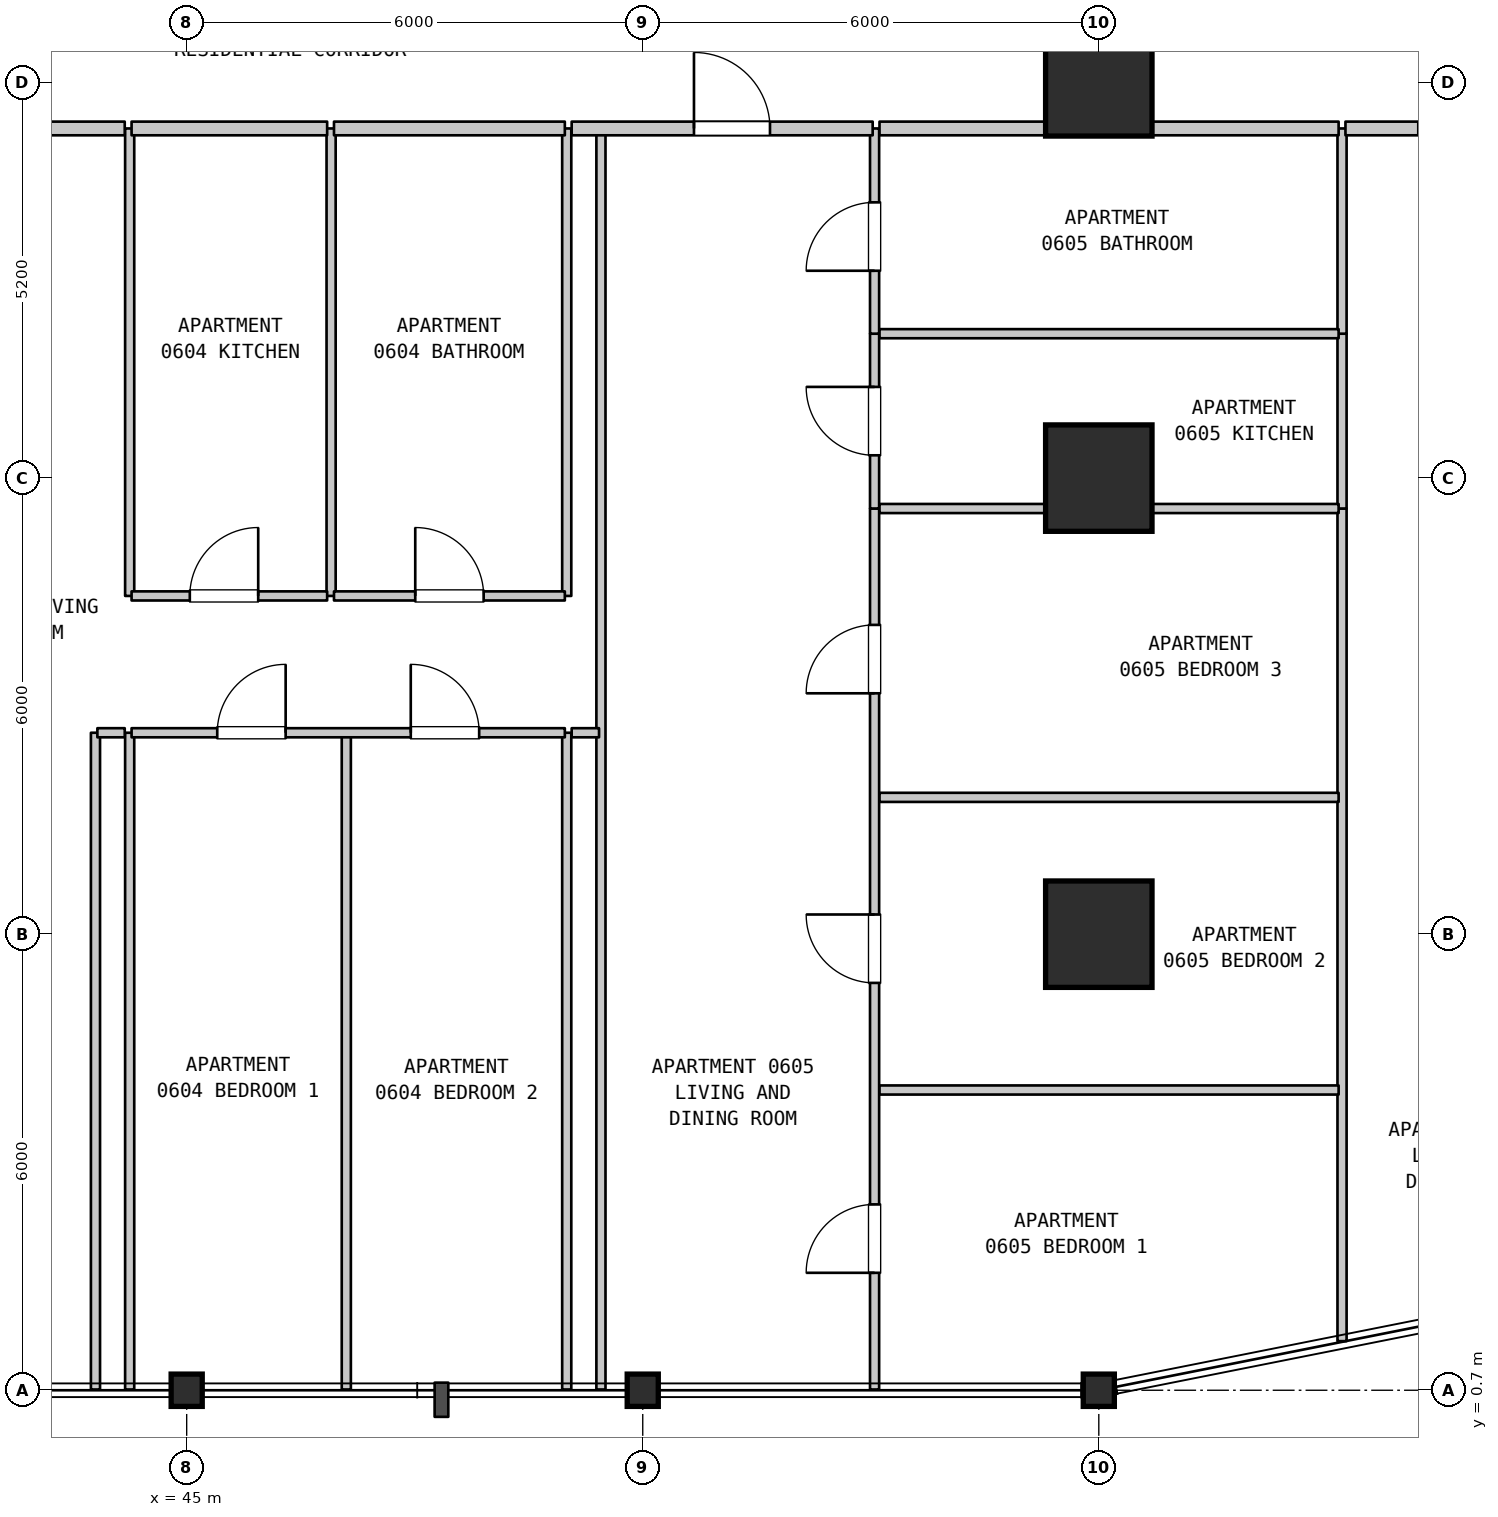
"""IFC4 building model, lengths in metres.
Left out: names, types, materials, properties, quantities, classifications, styles, units other than length and angle.
Written with IfcOpenShell. Run it as: python <this file> out.ifc"""

import sys

from ifc_helpers import new_model, si_unit, direction, frame, frame_2d, origin, origin_2d, place, context, subcontext, project, spatial, rectangle, i_section, extrude, element, fill, save


model = new_model("IFC4")
c1 = context("Model", 3, precision=1e-05, world=origin(), true_north=direction((0.0, 1.0)))
c2 = subcontext(c1, "Body", "Model", "MODEL_VIEW")
j1 = project(units=[si_unit("LENGTHUNIT", "METRE"), si_unit("PLANEANGLEUNIT", "RADIAN")], contexts=[c1])
p1 = place(None, origin())
s1 = spatial("IfcSite", under=j1, at=p1, CompositionType="ELEMENT")
p2 = place(p1, origin())
s2 = spatial("IfcBuilding", under=s1, at=p2, CompositionType="ELEMENT")
p3 = place(p2, frame((0.0, 0.0, 31.4)))
s3 = spatial("IfcBuildingStorey", under=s2, at=p3, CompositionType="ELEMENT", Elevation=31.4)
for number, where, z_axis, x_axis in (
    (1, (45.0, 0.7, 0.0), (0.0, 0.0, 1.0), (1.0, 0.0, 0.0)),
    (2, (51.0, 0.7, 0.0), (0.0, 0.0, 1.0), (1.0, 0.0, 0.0)),
    (3, (57.0, 0.7, 0.0), (0.0, 0.0, 1.0), (1.0, 0.0, 0.0)),
):
    element("IfcColumn", number, at=place(p3, frame(where, z_axis=z_axis, x_axis=x_axis)), inside=s3, PredefinedType="COLUMN", context=c2, shape_type="SweptSolid", body=[
        extrude(i_section(OverallWidth=0.409, OverallDepth=0.425, WebThickness=0.032, FlangeThickness=0.052, FilletRadius=0.015, at=origin_2d()), origin(), (0.0, 0.0, 1.0), 3.7),
    ])
for number, where, z_axis, x_axis in (
    (4, (57.0, 6.7, 0.0), (0.0, 0.0, 1.0), (1.0, 0.0, 0.0)),
    (5, (57.0, 12.7, 0.0), (0.0, 0.0, 1.0), (1.0, 0.0, 0.0)),
    (6, (57.0, 17.9, 0.0), (0.0, 0.0, 1.0), (1.0, 0.0, 0.0)),
):
    element("IfcColumn", number, at=place(p3, frame(where, z_axis=z_axis, x_axis=x_axis)), inside=s3, PredefinedType="COLUMN", context=c2, shape_type="SweptSolid", body=[
        extrude(rectangle(XDim=1.4, YDim=1.4, at=origin_2d()), origin(), (0.0, 0.0, 1.0), 3.7),
    ])
for number, where, z_axis, x_axis in (
    (7, (43.8, 0.71, 0.0), (0.0, 0.0, 1.0), (0.0, 1.0, 0.0)),
    (8, (44.25, 0.71, 0.0), (0.0, 0.0, 1.0), (0.0, 1.0, 0.0)),
):
    element("IfcWall", number, at=place(p3, frame(where, z_axis=z_axis, x_axis=x_axis)), inside=s3, PredefinedType="PARTITIONING", context=c2, shape_type="SweptSolid", body=[
        extrude(rectangle(XDim=8.64, YDim=0.12, at=frame_2d((4.32, 0.0))), origin(), (0.0, 0.0, 1.0), 3.385),
    ])
for number, where, z_axis, x_axis in (
    (9, (44.25, 11.15, 0.0), (0.0, 0.0, 1.0), (0.0, 1.0, 0.0)),
    (10, (46.9, 11.15, 0.0), (0.0, 0.0, 1.0), (0.0, 1.0, 0.0)),
):
    element("IfcWall", number, at=place(p3, frame(where, z_axis=z_axis, x_axis=x_axis)), inside=s3, PredefinedType="PARTITIONING", context=c2, shape_type="SweptSolid", body=[
        extrude(rectangle(XDim=6.15, YDim=0.12, at=frame_2d((3.075, 0.0))), origin(), (0.0, 0.0, 1.0), 3.385),
    ])
for number, where, z_axis, x_axis in (
    (11, (47.1, 0.71, 0.0), (0.0, 0.0, 1.0), (0.0, 1.0, 0.0)),
    (12, (50.0, 0.71, 0.0), (0.0, 0.0, 1.0), (0.0, 1.0, 0.0)),
):
    element("IfcWall", number, at=place(p3, frame(where, z_axis=z_axis, x_axis=x_axis)), inside=s3, PredefinedType="PARTITIONING", context=c2, shape_type="SweptSolid", body=[
        extrude(rectangle(XDim=8.64, YDim=0.12, at=frame_2d((4.32, 0.0))), origin(), (0.0, 0.0, 1.0), 3.385),
    ])
p4 = place(p3, frame((50.0, 11.15, 0.0), z_axis=(0.0, 0.0, 1.0), x_axis=(0.0, 1.0, 0.0)))
e13 = element("IfcWall", 13, at=p4, inside=s3, PredefinedType="PARTITIONING", context=c2, shape_type="SweptSolid", body=[
    extrude(rectangle(XDim=6.15, YDim=0.12, at=frame_2d((3.075, 0.0))), origin(), (0.0, 0.0, 1.0), 3.385),
])
p5 = place(p3, frame((50.45, 0.71, 0.0), z_axis=(0.0, 0.0, 1.0), x_axis=(0.0, 1.0, 0.0)))
e14 = element("IfcWall", 14, at=p5, inside=s3, PredefinedType="PARTITIONING", context=c2, shape_type="SweptSolid", body=[
    extrude(rectangle(XDim=16.59, YDim=0.12, at=frame_2d((8.295, 0.0))), origin(), (0.0, 0.0, 1.0), 3.385),
])
p6 = place(p3, frame((54.05, 0.71, 0.0), z_axis=(0.0, 0.0, 1.0), x_axis=(0.0, 1.0, 0.0)))
e15 = element("IfcWall", 15, at=p6, inside=s3, PredefinedType="PARTITIONING", context=c2, shape_type="SweptSolid", body=[
    extrude(rectangle(XDim=11.59, YDim=0.12, at=frame_2d((5.795, 0.0))), origin(), (0.0, 0.0, 1.0), 3.385),
])
p7 = place(p6, frame((1.535, 0.0, 0.0)))
e16 = element("IfcOpeningElement", 16, at=p7, cuts=e15, PredefinedType="OPENING", context=c2, shape_type="SweptSolid", body=[
    extrude(rectangle(XDim=0.9, YDim=2.15, at=frame_2d((0.45, 1.075))), frame((0.0, 0.07, 0.0), z_axis=(0.0, -1.0, 0.0), x_axis=(1.0, 0.0, 0.0)), (0.0, 0.0, 1.0), 0.14),
])
p8 = place(p6, frame((5.349, 0.0, 0.0)))
e17 = element("IfcOpeningElement", 17, at=p8, cuts=e15, PredefinedType="OPENING", context=c2, shape_type="SweptSolid", body=[
    extrude(rectangle(XDim=0.9, YDim=2.15, at=frame_2d((0.45, 1.075))), frame((0.0, 0.07, 0.0), z_axis=(0.0, -1.0, 0.0), x_axis=(1.0, 0.0, 0.0)), (0.0, 0.0, 1.0), 0.14),
])
p9 = place(p6, frame((9.159, 0.0, 0.0)))
e18 = element("IfcOpeningElement", 18, at=p9, cuts=e15, PredefinedType="OPENING", context=c2, shape_type="SweptSolid", body=[
    extrude(rectangle(XDim=0.9, YDim=2.15, at=frame_2d((0.45, 1.075))), frame((0.0, 0.07, 0.0), z_axis=(0.0, -1.0, 0.0), x_axis=(1.0, 0.0, 0.0)), (0.0, 0.0, 1.0), 0.14),
])
p10 = place(p3, frame((54.05, 12.3, 0.0), z_axis=(0.0, 0.0, 1.0), x_axis=(0.0, 1.0, 0.0)))
e19 = element("IfcWall", 19, at=p10, inside=s3, PredefinedType="PARTITIONING", context=c2, shape_type="SweptSolid", body=[
    extrude(rectangle(XDim=2.3, YDim=0.12, at=frame_2d((1.15, 0.0))), origin(), (0.0, 0.0, 1.0), 3.385),
])
p11 = place(p10, frame((0.7, 0.0, 0.0)))
e20 = element("IfcOpeningElement", 20, at=p11, cuts=e19, PredefinedType="OPENING", context=c2, shape_type="SweptSolid", body=[
    extrude(rectangle(XDim=0.9, YDim=2.15, at=frame_2d((0.45, 1.075))), frame((0.0, 0.07, 0.0), z_axis=(0.0, -1.0, 0.0), x_axis=(1.0, 0.0, 0.0)), (0.0, 0.0, 1.0), 0.14),
])
p12 = place(p3, frame((54.05, 14.6, 0.0), z_axis=(0.0, 0.0, 1.0), x_axis=(0.0, 1.0, 0.0)))
e21 = element("IfcWall", 21, at=p12, inside=s3, PredefinedType="PARTITIONING", context=c2, shape_type="SweptSolid", body=[
    extrude(rectangle(XDim=2.7, YDim=0.12, at=frame_2d((1.35, 0.0))), origin(), (0.0, 0.0, 1.0), 3.385),
])
p13 = place(p12, frame((0.828, 0.0, 0.0)))
e22 = element("IfcOpeningElement", 22, at=p13, cuts=e21, PredefinedType="OPENING", context=c2, shape_type="SweptSolid", body=[
    extrude(rectangle(XDim=0.9, YDim=2.1, at=frame_2d((0.45, 1.05))), frame((0.0, 0.07, 0.0), z_axis=(0.0, -1.0, 0.0), x_axis=(1.0, 0.0, 0.0)), (0.0, 0.0, 1.0), 0.14),
])
p14 = place(p3, frame((60.2, 1.346, 0.0), z_axis=(0.0, 0.0, 1.0), x_axis=(0.0, 1.0, 0.0)))
e23 = element("IfcWall", 23, at=p14, inside=s3, PredefinedType="PARTITIONING", context=c2, shape_type="SweptSolid", body=[
    extrude(rectangle(XDim=10.954, YDim=0.12, at=frame_2d((5.477, 0.0))), origin(), (0.0, 0.0, 1.0), 3.385),
])
p15 = place(p3, frame((60.2, 12.3, 0.0), z_axis=(0.0, 0.0, 1.0), x_axis=(0.0, 1.0, 0.0)))
e24 = element("IfcWall", 24, at=p15, inside=s3, PredefinedType="PARTITIONING", context=c2, shape_type="SweptSolid", body=[
    extrude(rectangle(XDim=2.3, YDim=0.12, at=frame_2d((1.15, 0.0))), origin(), (0.0, 0.0, 1.0), 3.385),
])
p16 = place(p3, frame((60.2, 14.6, 0.0), z_axis=(0.0, 0.0, 1.0), x_axis=(0.0, 1.0, 0.0)))
e25 = element("IfcWall", 25, at=p16, inside=s3, PredefinedType="PARTITIONING", context=c2, shape_type="SweptSolid", body=[
    extrude(rectangle(XDim=2.7, YDim=0.12, at=frame_2d((1.35, 0.0))), origin(), (0.0, 0.0, 1.0), 3.385),
])
for number, where, z_axis, x_axis in (
    (26, (54.115, 4.65, 0.0), (0.0, 0.0, 1.0), (1.0, 0.0, 0.0)),
    (27, (54.115, 8.5, 0.0), (0.0, 0.0, 1.0), (1.0, 0.0, 0.0)),
):
    element("IfcWall", number, at=place(p3, frame(where, z_axis=z_axis, x_axis=x_axis)), inside=s3, PredefinedType="PARTITIONING", context=c2, shape_type="SweptSolid", body=[
        extrude(rectangle(XDim=6.04, YDim=0.12, at=frame_2d((3.02, 0.0))), origin(), (0.0, 0.0, 1.0), 3.385),
    ])
p17 = place(p3, frame((43.825, 9.35, 0.0), z_axis=(0.0, 0.0, 1.0), x_axis=(1.0, 0.0, 0.0)))
e28 = element("IfcWall", 28, at=p17, inside=s3, PredefinedType="PARTITIONING", context=c2, shape_type="SweptSolid", body=[
    extrude(rectangle(XDim=0.36, YDim=0.12, at=frame_2d((0.18, 0.0))), origin(), (0.0, 0.0, 1.0), 3.385),
])
p18 = place(p3, frame((44.275, 9.35, 0.0), z_axis=(0.0, 0.0, 1.0), x_axis=(1.0, 0.0, 0.0)))
e29 = element("IfcWall", 29, at=p18, inside=s3, PredefinedType="PARTITIONING", context=c2, shape_type="SweptSolid", body=[
    extrude(rectangle(XDim=5.7, YDim=0.12, at=frame_2d((2.85, 0.0))), origin(), (0.0, 0.0, 1.0), 3.385),
])
p19 = place(p18, frame((1.127, 0.0, 0.0)))
e30 = element("IfcOpeningElement", 30, at=p19, cuts=e29, PredefinedType="OPENING", context=c2, shape_type="SweptSolid", body=[
    extrude(rectangle(XDim=0.9, YDim=2.15, at=frame_2d((0.45, 1.075))), frame((0.0, 0.07, 0.0), z_axis=(0.0, -1.0, 0.0), x_axis=(1.0, 0.0, 0.0)), (0.0, 0.0, 1.0), 0.14),
])
p20 = place(p18, frame((3.673, 0.0, 0.0)))
e31 = element("IfcOpeningElement", 31, at=p20, cuts=e29, PredefinedType="OPENING", context=c2, shape_type="SweptSolid", body=[
    extrude(rectangle(XDim=0.9, YDim=2.15, at=frame_2d((0.45, 1.075))), frame((0.0, 0.07, 0.0), z_axis=(0.0, -1.0, 0.0), x_axis=(1.0, 0.0, 0.0)), (0.0, 0.0, 1.0), 0.14),
])
p21 = place(p3, frame((50.065, 9.35, 0.0), z_axis=(0.0, 0.0, 1.0), x_axis=(1.0, 0.0, 0.0)))
e32 = element("IfcWall", 32, at=p21, inside=s3, PredefinedType="PARTITIONING", context=c2, shape_type="SweptSolid", body=[
    extrude(rectangle(XDim=0.36, YDim=0.12, at=frame_2d((0.18, 0.0))), origin(), (0.0, 0.0, 1.0), 3.385),
])
p22 = place(p3, frame((44.275, 11.15, 0.0), z_axis=(0.0, 0.0, 1.0), x_axis=(1.0, 0.0, 0.0)))
e33 = element("IfcWall", 33, at=p22, inside=s3, PredefinedType="PARTITIONING", context=c2, shape_type="SweptSolid", body=[
    extrude(rectangle(XDim=2.573, YDim=0.12, at=frame_2d((1.287, 0.0))), origin(), (0.0, 0.0, 1.0), 3.385),
])
p23 = place(p22, frame((0.766, 0.0, 0.0)))
e34 = element("IfcOpeningElement", 34, at=p23, cuts=e33, PredefinedType="OPENING", context=c2, shape_type="SweptSolid", body=[
    extrude(rectangle(XDim=0.9, YDim=2.15, at=frame_2d((0.45, 1.075))), frame((0.0, 0.07, 0.0), z_axis=(0.0, -1.0, 0.0), x_axis=(1.0, 0.0, 0.0)), (0.0, 0.0, 1.0), 0.14),
])
p24 = place(p3, frame((46.938, 11.15, 0.0), z_axis=(0.0, 0.0, 1.0), x_axis=(1.0, 0.0, 0.0)))
e35 = element("IfcWall", 35, at=p24, inside=s3, PredefinedType="PARTITIONING", context=c2, shape_type="SweptSolid", body=[
    extrude(rectangle(XDim=3.037, YDim=0.12, at=frame_2d((1.519, 0.0))), origin(), (0.0, 0.0, 1.0), 3.385),
])
p25 = place(p24, frame((1.069, 0.0, 0.0)))
e36 = element("IfcOpeningElement", 36, at=p25, cuts=e35, PredefinedType="OPENING", context=c2, shape_type="SweptSolid", body=[
    extrude(rectangle(XDim=0.9, YDim=2.1, at=frame_2d((0.45, 1.05))), frame((0.0, 0.07, 0.0), z_axis=(0.0, -1.0, 0.0), x_axis=(1.0, 0.0, 0.0)), (0.0, 0.0, 1.0), 0.14),
])
for number, where, z_axis, x_axis in (
    (37, (54.115, 12.3, 0.0), (0.0, 0.0, 1.0), (1.0, 0.0, 0.0)),
    (38, (54.115, 14.6, 0.0), (0.0, 0.0, 1.0), (1.0, 0.0, 0.0)),
):
    element("IfcWall", number, at=place(p3, frame(where, z_axis=z_axis, x_axis=x_axis)), inside=s3, PredefinedType="PARTITIONING", context=c2, shape_type="SweptSolid", body=[
        extrude(rectangle(XDim=6.04, YDim=0.12, at=frame_2d((3.02, 0.0))), origin(), (0.0, 0.0, 1.0), 3.385),
    ])
p26 = place(p3, frame((39.775, 17.3, 0.0), z_axis=(0.0, 0.0, 1.0), x_axis=(1.0, 0.0, 0.0)))
e39 = element("IfcWall", 39, at=p26, inside=s3, PredefinedType="STANDARD", context=c2, shape_type="SweptSolid", body=[
    extrude(rectangle(XDim=4.41, YDim=0.18, at=frame_2d((2.205, 0.0))), origin(), (0.0, 0.0, 1.0), 3.385),
])
p27 = place(p26, frame((1.905, 0.0, 0.0)))
e40 = element("IfcOpeningElement", 40, at=p27, cuts=e39, PredefinedType="OPENING", context=c2, shape_type="SweptSolid", body=[
    extrude(rectangle(XDim=1.0, YDim=2.15, at=frame_2d((0.5, 1.075))), frame((0.0, 0.1, 0.0), z_axis=(0.0, -1.0, 0.0), x_axis=(1.0, 0.0, 0.0)), (0.0, 0.0, 1.0), 0.2),
])
p28 = place(p3, frame((44.275, 17.3, 0.0), z_axis=(0.0, 0.0, 1.0), x_axis=(1.0, 0.0, 0.0)))
e41 = element("IfcWall", 41, at=p28, inside=s3, PredefinedType="STANDARD", context=c2, shape_type="SweptSolid", body=[
    extrude(rectangle(XDim=2.573, YDim=0.18, at=frame_2d((1.287, 0.0))), origin(), (0.0, 0.0, 1.0), 3.385),
])
p29 = place(p3, frame((46.938, 17.3, 0.0), z_axis=(0.0, 0.0, 1.0), x_axis=(1.0, 0.0, 0.0)))
e42 = element("IfcWall", 42, at=p29, inside=s3, PredefinedType="STANDARD", context=c2, shape_type="SweptSolid", body=[
    extrude(rectangle(XDim=3.037, YDim=0.18, at=frame_2d((1.519, 0.0))), origin(), (0.0, 0.0, 1.0), 3.385),
])
p30 = place(p3, frame((50.065, 17.3, 0.0), z_axis=(0.0, 0.0, 1.0), x_axis=(1.0, 0.0, 0.0)))
e43 = element("IfcWall", 43, at=p30, inside=s3, PredefinedType="STANDARD", context=c2, shape_type="SweptSolid", body=[
    extrude(rectangle(XDim=3.96, YDim=0.18, at=frame_2d((1.98, 0.0))), origin(), (0.0, 0.0, 1.0), 3.385),
])
p31 = place(p30, frame((1.609, 0.0, 0.0)))
e44 = element("IfcOpeningElement", 44, at=p31, cuts=e43, PredefinedType="OPENING", context=c2, shape_type="SweptSolid", body=[
    extrude(rectangle(XDim=1.0, YDim=2.15, at=frame_2d((0.5, 1.075))), frame((0.0, 0.1, 0.0), z_axis=(0.0, -1.0, 0.0), x_axis=(1.0, 0.0, 0.0)), (0.0, 0.0, 1.0), 0.2),
])
p32 = place(p3, frame((54.115, 17.3, 0.0), z_axis=(0.0, 0.0, 1.0), x_axis=(1.0, 0.0, 0.0)))
e45 = element("IfcWall", 45, at=p32, inside=s3, PredefinedType="STANDARD", context=c2, shape_type="SweptSolid", body=[
    extrude(rectangle(XDim=6.04, YDim=0.18, at=frame_2d((3.02, 0.0))), origin(), (0.0, 0.0, 1.0), 3.385),
])
p33 = place(p3, frame((60.245, 17.3, 0.0), z_axis=(0.0, 0.0, 1.0), x_axis=(1.0, 0.0, 0.0)))
e46 = element("IfcWall", 46, at=p33, inside=s3, PredefinedType="STANDARD", context=c2, shape_type="SweptSolid", body=[
    extrude(rectangle(XDim=3.51, YDim=0.18, at=frame_2d((1.755, 0.0))), origin(), (0.0, 0.0, 1.0), 3.385),
])
p34 = place(p33, frame((0.958, 0.0, 0.0)))
e47 = element("IfcOpeningElement", 47, at=p34, cuts=e46, PredefinedType="OPENING", context=c2, shape_type="SweptSolid", body=[
    extrude(rectangle(XDim=1.0, YDim=2.15, at=frame_2d((0.5, 1.075))), frame((0.0, 0.1, 0.0), z_axis=(0.0, -1.0, 0.0), x_axis=(1.0, 0.0, 0.0)), (0.0, 0.0, 1.0), 0.2),
])
p35 = place(p7, origin())
e48 = element("IfcDoor", 48, at=p35, inside=s3, OperationType="SINGLE_SWING_LEFT", PredefinedType="DOOR", context=c2, shape_type="SweptSolid", body=[
    extrude(rectangle(XDim=0.9, YDim=2.15, at=frame_2d((0.45, 1.075))), frame((0.0, 0.025, 0.0), z_axis=(0.0, -1.0, 0.0), x_axis=(1.0, 0.0, 0.0)), (0.0, 0.0, 1.0), 0.05),
])
fill(e16, e48)
p36 = place(p8, origin())
e49 = element("IfcDoor", 49, at=p36, inside=s3, OperationType="SINGLE_SWING_RIGHT", PredefinedType="DOOR", context=c2, shape_type="SweptSolid", body=[
    extrude(rectangle(XDim=0.9, YDim=2.15, at=frame_2d((0.45, 1.075))), frame((0.0, 0.025, 0.0), z_axis=(0.0, -1.0, 0.0), x_axis=(1.0, 0.0, 0.0)), (0.0, 0.0, 1.0), 0.05),
])
fill(e17, e49)
p37 = place(p9, origin())
e50 = element("IfcDoor", 50, at=p37, inside=s3, OperationType="SINGLE_SWING_LEFT", PredefinedType="DOOR", context=c2, shape_type="SweptSolid", body=[
    extrude(rectangle(XDim=0.9, YDim=2.15, at=frame_2d((0.45, 1.075))), frame((0.0, 0.025, 0.0), z_axis=(0.0, -1.0, 0.0), x_axis=(1.0, 0.0, 0.0)), (0.0, 0.0, 1.0), 0.05),
])
fill(e18, e50)
p38 = place(p11, origin())
e51 = element("IfcDoor", 51, at=p38, inside=s3, OperationType="SINGLE_SWING_RIGHT", PredefinedType="DOOR", context=c2, shape_type="SweptSolid", body=[
    extrude(rectangle(XDim=0.9, YDim=2.15, at=frame_2d((0.45, 1.075))), frame((0.0, 0.025, 0.0), z_axis=(0.0, -1.0, 0.0), x_axis=(1.0, 0.0, 0.0)), (0.0, 0.0, 1.0), 0.05),
])
fill(e20, e51)
p39 = place(p13, origin())
e52 = element("IfcDoor", 52, at=p39, inside=s3, OperationType="SINGLE_SWING_LEFT", PredefinedType="DOOR", context=c2, shape_type="SweptSolid", body=[
    extrude(rectangle(XDim=0.9, YDim=2.1, at=frame_2d((0.45, 1.05))), frame((0.0, 0.025, 0.0), z_axis=(0.0, -1.0, 0.0), x_axis=(1.0, 0.0, 0.0)), (0.0, 0.0, 1.0), 0.05),
])
fill(e22, e52)
p40 = place(p19, origin())
e53 = element("IfcDoor", 53, at=p40, inside=s3, OperationType="SINGLE_SWING_RIGHT", PredefinedType="DOOR", context=c2, shape_type="SweptSolid", body=[
    extrude(rectangle(XDim=0.9, YDim=2.15, at=frame_2d((0.45, 1.075))), frame((0.0, 0.025, 0.0), z_axis=(0.0, -1.0, 0.0), x_axis=(1.0, 0.0, 0.0)), (0.0, 0.0, 1.0), 0.05),
])
fill(e30, e53)
p41 = place(p20, origin())
e54 = element("IfcDoor", 54, at=p41, inside=s3, OperationType="SINGLE_SWING_LEFT", PredefinedType="DOOR", context=c2, shape_type="SweptSolid", body=[
    extrude(rectangle(XDim=0.9, YDim=2.15, at=frame_2d((0.45, 1.075))), frame((0.0, 0.025, 0.0), z_axis=(0.0, -1.0, 0.0), x_axis=(1.0, 0.0, 0.0)), (0.0, 0.0, 1.0), 0.05),
])
fill(e31, e54)
p42 = place(p23, origin())
e55 = element("IfcDoor", 55, at=p42, inside=s3, OperationType="SINGLE_SWING_RIGHT", PredefinedType="DOOR", context=c2, shape_type="SweptSolid", body=[
    extrude(rectangle(XDim=0.9, YDim=2.15, at=frame_2d((0.45, 1.075))), frame((0.0, 0.025, 0.0), z_axis=(0.0, -1.0, 0.0), x_axis=(1.0, 0.0, 0.0)), (0.0, 0.0, 1.0), 0.05),
])
fill(e34, e55)
p43 = place(p25, origin())
e56 = element("IfcDoor", 56, at=p43, inside=s3, OperationType="SINGLE_SWING_LEFT", PredefinedType="DOOR", context=c2, shape_type="SweptSolid", body=[
    extrude(rectangle(XDim=0.9, YDim=2.1, at=frame_2d((0.45, 1.05))), frame((0.0, 0.025, 0.0), z_axis=(0.0, -1.0, 0.0), x_axis=(1.0, 0.0, 0.0)), (0.0, 0.0, 1.0), 0.05),
])
fill(e36, e56)
p44 = place(p31, origin())
e57 = element("IfcDoor", 57, at=p44, inside=s3, OperationType="SINGLE_SWING_LEFT", PredefinedType="DOOR", context=c2, shape_type="SweptSolid", body=[
    extrude(rectangle(XDim=1.0, YDim=2.15, at=frame_2d((0.5, 1.075))), frame((0.0, 0.025, 0.0), z_axis=(0.0, -1.0, 0.0), x_axis=(1.0, 0.0, 0.0)), (0.0, 0.0, 1.0), 0.05),
])
fill(e44, e57)
save(model, sys.argv[1])
